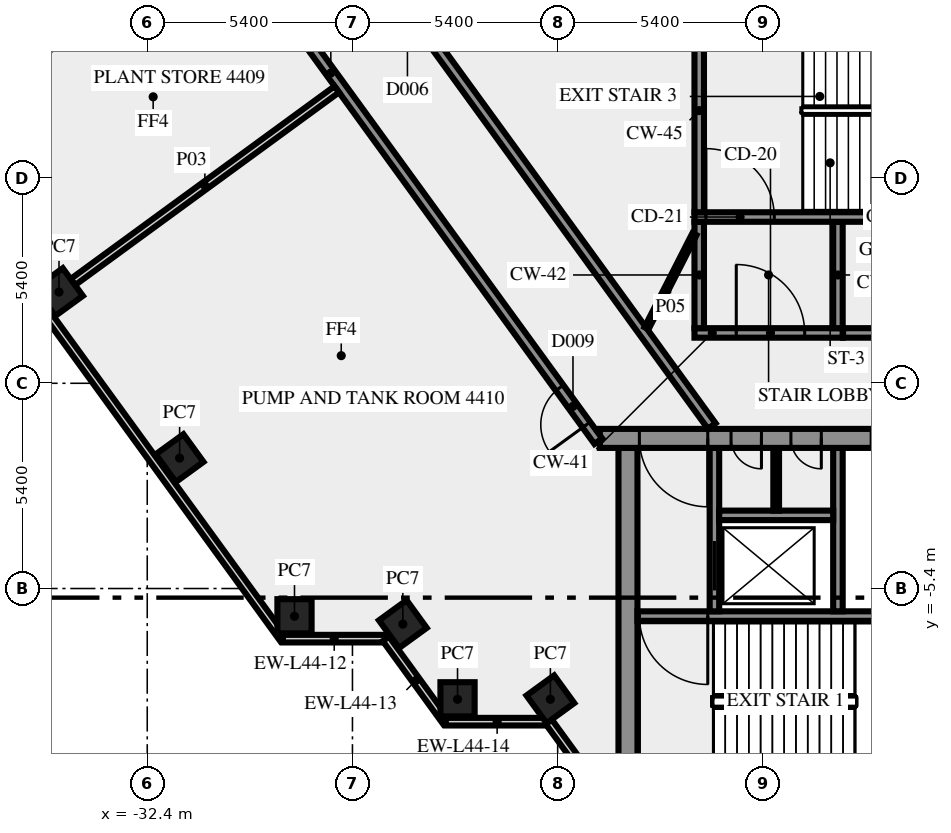
"""IFC4 building model, lengths in metres.
Left out: names, types, materials, properties, quantities, classifications, styles, units other than length and angle.
Written with IfcOpenShell. Run it as: python <this file> out.ifc"""

import sys

from ifc_helpers import new_model, si_unit, direction, frame, frame_2d, origin, origin_2d, place, context, subcontext, project, spatial, rectangle, extrude, element, fill, save


model = new_model("IFC4")
c1 = context("Model", 3, precision=1e-05, world=origin(), true_north=direction((0.0, 1.0)))
c2 = subcontext(c1, "Body", "Model", "MODEL_VIEW")
j1 = project(units=[si_unit("LENGTHUNIT", "METRE"), si_unit("PLANEANGLEUNIT", "RADIAN")], contexts=[c1])
p1 = place(None, origin())
s1 = spatial("IfcSite", under=j1, at=p1, CompositionType="ELEMENT")
p2 = place(p1, origin())
s2 = spatial("IfcBuilding", under=s1, at=p2, CompositionType="ELEMENT")
p3 = place(p2, frame((0.0, 0.0, 188.0)))
s3 = spatial("IfcBuildingStorey", under=s2, at=p3, CompositionType="ELEMENT", Elevation=188.0)
for number, where, z_axis, x_axis in (
    (1, (-34.722, 2.4, 0.0), (0.0, 0.0, 1.0), (0.588, -0.809, 0.0)),
    (2, (-31.548, -1.969, 0.0), (0.0, 0.0, 1.0), (0.588, -0.809, 0.0)),
    (3, (-28.525, -6.13, 0.0), (0.0, 0.0, 1.0), (1.0, 0.0, 0.0)),
    (4, (-25.674, -6.337, 0.0), (0.0, 0.0, 1.0), (0.588, -0.809, 0.0)),
    (5, (-24.235, -8.315, 0.0), (0.0, 0.0, 1.0), (1.0, 0.0, 0.0)),
    (6, (-21.792, -8.315, 0.0), (0.0, 0.0, 1.0), (0.588, -0.809, 0.0)),
):
    element("IfcColumn", number, at=place(p3, frame(where, z_axis=z_axis, x_axis=x_axis)), inside=s3, PredefinedType="COLUMN", context=c2, shape_type="SweptSolid", body=[
        extrude(rectangle(XDim=0.9, YDim=0.9, at=origin_2d()), origin(), (0.0, 0.0, 1.0), 5.65),
    ])
p4 = place(p3, frame((-45.84, 16.701, 0.0), z_axis=(0.0, 0.0, 1.0), x_axis=(0.587788110303, -0.809014917901, 0.0)))
e7 = element("IfcWall", 7, at=p4, inside=s3, PredefinedType="SOLIDWALL", context=c2, shape_type="SweptSolid", body=[
    extrude(rectangle(XDim=28.956, YDim=0.2, at=frame_2d((14.478, 0.0))), origin(), (0.0, 0.0, 1.0), 5.65),
])
p5 = place(p3, frame((-28.83, -6.719, 0.0), z_axis=(0.0, 0.0, 1.0), x_axis=(1.0, 0.0, 0.0)))
e8 = element("IfcWall", 8, at=p5, inside=s3, PredefinedType="SOLIDWALL", context=c2, shape_type="SweptSolid", body=[
    extrude(rectangle(XDim=2.7, YDim=0.2, at=frame_2d((1.35, 0.0))), origin(), (0.0, 0.0, 1.0), 5.65),
])
p6 = place(p3, frame((-26.12, -6.724, 0.0), z_axis=(0.0, 0.0, 1.0), x_axis=(0.587720002413, -0.809064397168, 0.0)))
e9 = element("IfcWall", 9, at=p6, inside=s3, PredefinedType="SOLIDWALL", context=c2, shape_type="SweptSolid", body=[
    extrude(rectangle(XDim=2.7, YDim=0.2, at=frame_2d((1.35, 0.0))), origin(), (0.0, 0.0, 1.0), 5.65),
])
p7 = place(p3, frame((-24.543, -8.904, 0.0), z_axis=(0.0, 0.0, 1.0), x_axis=(1.0, 0.0, 0.0)))
e10 = element("IfcWall", 10, at=p7, inside=s3, PredefinedType="SOLIDWALL", context=c2, shape_type="SweptSolid", body=[
    extrude(rectangle(XDim=2.7, YDim=0.2, at=frame_2d((1.35, 0.0))), origin(), (0.0, 0.0, 1.0), 5.65),
])
p8 = place(p3, frame((-21.833, -8.909, 0.0), z_axis=(0.0, 0.0, 1.0), x_axis=(0.587766567315, -0.809030569476, 0.0)))
e11 = element("IfcWall", 11, at=p8, inside=s3, PredefinedType="SOLIDWALL", context=c2, shape_type="SweptSolid", body=[
    extrude(rectangle(XDim=2.688, YDim=0.2, at=frame_2d((1.344, 0.0))), origin(), (0.0, 0.0, 1.0), 5.65),
])
p9 = place(p3, frame((-19.75, -10.5, 0.0), z_axis=(0.0, 0.0, 1.0), x_axis=(0.0, 1.0, 0.0)))
e12 = element("IfcWall", 12, at=p9, inside=s3, PredefinedType="SHEAR", context=c2, shape_type="SweptSolid", body=[
    extrude(rectangle(XDim=8.8, YDim=0.5, at=frame_2d((4.4, 0.0))), origin(), (0.0, 0.0, 1.0), 5.65),
])
p10 = place(p3, frame((-11.45, -6.125, 0.0), z_axis=(0.0, 0.0, 1.0), x_axis=(-1.0, 0.0, 0.0)))
e13 = element("IfcWall", 13, at=p10, inside=s3, PredefinedType="SHEAR", context=c2, shape_type="SweptSolid", body=[
    extrude(rectangle(XDim=8.05, YDim=0.25, at=frame_2d((4.025, 0.0))), origin(), (0.0, 0.0, 1.0), 5.65),
])
p11 = place(p10, frame((6.2, 0.0, 0.0)))
e14 = element("IfcOpeningElement", 14, at=p11, cuts=e13, PredefinedType="OPENING", context=c2, shape_type="SweptSolid", body=[
    extrude(rectangle(XDim=1.8, YDim=2.1, at=frame_2d((0.9, 1.05))), frame((0.0, 0.135, 0.0), z_axis=(0.0, -1.0, 0.0), x_axis=(1.0, 0.0, 0.0)), (0.0, 0.0, 1.0), 0.27),
])
p12 = place(p3, frame((-17.475, -6.0, 0.0), z_axis=(0.0, 0.0, 1.0), x_axis=(0.0, 1.0, 0.0)))
e15 = element("IfcWall", 15, at=p12, inside=s3, PredefinedType="SHEAR", context=c2, shape_type="SweptSolid", body=[
    extrude(rectangle(XDim=4.3, YDim=0.25, at=frame_2d((2.15, 0.0))), origin(), (0.0, 0.0, 1.0), 5.65),
])
p13 = place(p12, frame((0.55, 0.0, 0.0)))
e16 = element("IfcOpeningElement", 16, at=p13, cuts=e15, PredefinedType="OPENING", context=c2, shape_type="SweptSolid", body=[
    extrude(rectangle(XDim=1.3, YDim=2.1, at=frame_2d((0.65, 1.05))), frame((0.0, 0.135, 0.0), z_axis=(0.0, -1.0, 0.0), x_axis=(1.0, 0.0, 0.0)), (0.0, 0.0, 1.0), 0.27),
])
p14 = place(p3, frame((-14.225, -6.0, 0.0), z_axis=(0.0, 0.0, 1.0), x_axis=(0.0, 1.0, 0.0)))
e17 = element("IfcWall", 17, at=p14, inside=s3, PredefinedType="SHEAR", context=c2, shape_type="SweptSolid", body=[
    extrude(rectangle(XDim=4.3, YDim=0.25, at=frame_2d((2.15, 0.0))), origin(), (0.0, 0.0, 1.0), 5.65),
])
p15 = place(p3, frame((-17.35, -3.475, 0.0), z_axis=(0.0, 0.0, 1.0), x_axis=(1.0, 0.0, 0.0)))
e18 = element("IfcWall", 18, at=p15, inside=s3, PredefinedType="SHEAR", context=c2, shape_type="SweptSolid", body=[
    extrude(rectangle(XDim=3.0, YDim=0.25, at=frame_2d((1.5, 0.0))), origin(), (0.0, 0.0, 1.0), 5.65),
])
p16 = place(p3, frame((-15.85, -3.35, 0.0), z_axis=(0.0, 0.0, 1.0), x_axis=(0.0, 1.0, 0.0)))
e19 = element("IfcWall", 19, at=p16, inside=s3, PredefinedType="PARTITIONING", context=c2, shape_type="SweptSolid", body=[
    extrude(rectangle(XDim=1.65, YDim=0.15, at=frame_2d((0.825, 0.0))), origin(), (0.0, 0.0, 1.0), 5.65),
])
p17 = place(p3, frame((20.49, -1.45, 0.0), z_axis=(0.0, 0.0, 1.0), x_axis=(-1.0, 0.0, 0.0)))
e20 = element("IfcWall", 20, at=p17, inside=s3, PredefinedType="SHEAR", context=c2, shape_type="SweptSolid", body=[
    extrude(rectangle(XDim=40.98, YDim=0.5, at=frame_2d((20.49, 0.0))), origin(), (0.0, 0.0, 1.0), 5.65),
])
p18 = place(p17, frame((38.14, 0.0, 0.0)))
e21 = element("IfcOpeningElement", 21, at=p18, cuts=e20, PredefinedType="OPENING", context=c2, shape_type="SweptSolid", body=[
    extrude(rectangle(XDim=1.8, YDim=2.1, at=frame_2d((0.9, 1.05))), frame((0.0, 0.26, 0.0), z_axis=(0.0, -1.0, 0.0), x_axis=(1.0, 0.0, 0.0)), (0.0, 0.0, 1.0), 0.52),
])
p19 = place(p17, frame((36.728, 0.0, 0.0)))
e22 = element("IfcOpeningElement", 22, at=p19, cuts=e20, PredefinedType="OPENING", context=c2, shape_type="SweptSolid", body=[
    extrude(rectangle(XDim=0.8, YDim=2.1, at=frame_2d((0.4, 1.05))), frame((0.0, 0.26, 0.0), z_axis=(0.0, -1.0, 0.0), x_axis=(1.0, 0.0, 0.0)), (0.0, 0.0, 1.0), 0.52),
])
p20 = place(p17, frame((35.153, 0.0, 0.0)))
e23 = element("IfcOpeningElement", 23, at=p20, cuts=e20, PredefinedType="OPENING", context=c2, shape_type="SweptSolid", body=[
    extrude(rectangle(XDim=0.8, YDim=2.1, at=frame_2d((0.4, 1.05))), frame((0.0, 0.26, 0.0), z_axis=(0.0, -1.0, 0.0), x_axis=(1.0, 0.0, 0.0)), (0.0, 0.0, 1.0), 0.52),
])
p21 = place(p17, frame((32.94, 0.0, 0.0)))
e24 = element("IfcOpeningElement", 24, at=p21, cuts=e20, PredefinedType="OPENING", context=c2, shape_type="SweptSolid", body=[
    extrude(rectangle(XDim=0.9, YDim=2.1, at=frame_2d((0.45, 1.05))), frame((0.0, 0.26, 0.0), z_axis=(0.0, -1.0, 0.0), x_axis=(1.0, 0.0, 0.0)), (0.0, 0.0, 1.0), 0.52),
])
p22 = place(p17, frame((30.502, 0.0, 0.0)))
e25 = element("IfcOpeningElement", 25, at=p22, cuts=e20, PredefinedType="OPENING", context=c2, shape_type="SweptSolid", body=[
    extrude(rectangle(XDim=0.9, YDim=2.1, at=frame_2d((0.45, 1.05))), frame((0.0, 0.26, 0.0), z_axis=(0.0, -1.0, 0.0), x_axis=(1.0, 0.0, 0.0)), (0.0, 0.0, 1.0), 0.52),
])
p23 = place(p17, frame((28.14, 0.0, 0.0)))
e26 = element("IfcOpeningElement", 26, at=p23, cuts=e20, PredefinedType="OPENING", context=c2, shape_type="SweptSolid", body=[
    extrude(rectangle(XDim=0.9, YDim=2.1, at=frame_2d((0.45, 1.05))), frame((0.0, 0.26, 0.0), z_axis=(0.0, -1.0, 0.0), x_axis=(1.0, 0.0, 0.0)), (0.0, 0.0, 1.0), 0.52),
])
p24 = place(p17, frame((25.478, 0.0, 0.0)))
e27 = element("IfcOpeningElement", 27, at=p24, cuts=e20, PredefinedType="OPENING", context=c2, shape_type="SweptSolid", body=[
    extrude(rectangle(XDim=0.9, YDim=2.1, at=frame_2d((0.45, 1.05))), frame((0.0, 0.26, 0.0), z_axis=(0.0, -1.0, 0.0), x_axis=(1.0, 0.0, 0.0)), (0.0, 0.0, 1.0), 0.52),
])
p25 = place(p17, frame((21.765, 0.0, 0.0)))
e28 = element("IfcOpeningElement", 28, at=p25, cuts=e20, PredefinedType="OPENING", context=c2, shape_type="SweptSolid", body=[
    extrude(rectangle(XDim=2.0, YDim=2.1, at=frame_2d((1.0, 1.05))), frame((0.0, 0.26, 0.0), z_axis=(0.0, -1.0, 0.0), x_axis=(1.0, 0.0, 0.0)), (0.0, 0.0, 1.0), 0.52),
])
p26 = place(p17, frame((7.14, 0.0, 0.0)))
e29 = element("IfcOpeningElement", 29, at=p26, cuts=e20, PredefinedType="OPENING", context=c2, shape_type="SweptSolid", body=[
    extrude(rectangle(XDim=0.9, YDim=2.1, at=frame_2d((0.45, 1.05))), frame((0.0, 0.26, 0.0), z_axis=(0.0, -1.0, 0.0), x_axis=(1.0, 0.0, 0.0)), (0.0, 0.0, 1.0), 0.52),
])
p27 = place(p17, frame((4.19, 0.0, 0.0)))
e30 = element("IfcOpeningElement", 30, at=p27, cuts=e20, PredefinedType="OPENING", context=c2, shape_type="SweptSolid", body=[
    extrude(rectangle(XDim=0.9, YDim=2.1, at=frame_2d((0.45, 1.05))), frame((0.0, 0.26, 0.0), z_axis=(0.0, -1.0, 0.0), x_axis=(1.0, 0.0, 0.0)), (0.0, 0.0, 1.0), 0.52),
])
p28 = place(p17, frame((1.04, 0.0, 0.0)))
e31 = element("IfcOpeningElement", 31, at=p28, cuts=e20, PredefinedType="OPENING", context=c2, shape_type="SweptSolid", body=[
    extrude(rectangle(XDim=1.8, YDim=2.1, at=frame_2d((0.9, 1.05))), frame((0.0, 0.26, 0.0), z_axis=(0.0, -1.0, 0.0), x_axis=(1.0, 0.0, 0.0)), (0.0, 0.0, 1.0), 0.52),
])
p29 = place(p3, frame((-18.0, 1.325, 0.0), z_axis=(0.0, 0.0, 1.0), x_axis=(1.0, 0.0, 0.0)))
e32 = element("IfcWall", 32, at=p29, inside=s3, PredefinedType="SHEAR", context=c2, shape_type="SweptSolid", body=[
    extrude(rectangle(XDim=3.9, YDim=0.25, at=frame_2d((1.95, 0.0))), origin(), (0.0, 0.0, 1.0), 5.65),
])
p30 = place(p29, frame((1.1, 0.0, 0.0)))
e33 = element("IfcOpeningElement", 33, at=p30, cuts=e32, PredefinedType="OPENING", context=c2, shape_type="SweptSolid", body=[
    extrude(rectangle(XDim=1.8, YDim=2.1, at=frame_2d((0.9, 1.05))), frame((0.0, 0.135, 0.0), z_axis=(0.0, -1.0, 0.0), x_axis=(1.0, 0.0, 0.0)), (0.0, 0.0, 1.0), 0.27),
])
for number, where, z_axis, x_axis in (
    (34, (-17.875, 1.45, 0.0), (0.0, 0.0, 1.0), (0.0, 1.0, 0.0)),
    (35, (-14.225, 1.45, 0.0), (0.0, 0.0, 1.0), (0.0, 1.0, 0.0)),
):
    element("IfcWall", number, at=place(p3, frame(where, z_axis=z_axis, x_axis=x_axis)), inside=s3, PredefinedType="SHEAR", context=c2, shape_type="SweptSolid", body=[
        extrude(rectangle(XDim=2.8, YDim=0.25, at=frame_2d((1.4, 0.0))), origin(), (0.0, 0.0, 1.0), 5.65),
    ])
p31 = place(p3, frame((-18.0, 4.375, 0.0), z_axis=(0.0, 0.0, 1.0), x_axis=(1.0, 0.0, 0.0)))
e36 = element("IfcWall", 36, at=p31, inside=s3, PredefinedType="SHEAR", context=c2, shape_type="SweptSolid", body=[
    extrude(rectangle(XDim=10.5, YDim=0.25, at=frame_2d((5.25, 0.0))), origin(), (0.0, 0.0, 1.0), 5.65),
])
p32 = place(p31, frame((0.3, 0.0, 0.0)))
e37 = element("IfcOpeningElement", 37, at=p32, cuts=e36, PredefinedType="OPENING", context=c2, shape_type="SweptSolid", body=[
    extrude(rectangle(XDim=1.8, YDim=2.1, at=frame_2d((0.9, 1.05))), frame((0.0, 0.135, 0.0), z_axis=(0.0, -1.0, 0.0), x_axis=(1.0, 0.0, 0.0)), (0.0, 0.0, 1.0), 0.27),
])
p33 = place(p3, frame((-17.875, 4.5, 0.0), z_axis=(0.0, 0.0, 1.0), x_axis=(0.0, 1.0, 0.0)))
e38 = element("IfcWall", 38, at=p33, inside=s3, PredefinedType="SHEAR", context=c2, shape_type="SweptSolid", body=[
    extrude(rectangle(XDim=5.35, YDim=0.25, at=frame_2d((2.675, 0.0))), origin(), (0.0, 0.0, 1.0), 5.65),
])
p34 = place(p3, frame((-20.531, -1.523, 0.0), z_axis=(0.0, 0.0, 1.0), x_axis=(-0.587786778139, 0.80901588578, 0.0)))
e39 = element("IfcWall", 39, at=p34, inside=s3, PredefinedType="SOLIDWALL", context=c2, shape_type="SweptSolid", body=[
    extrude(rectangle(XDim=34.212, YDim=0.25, at=frame_2d((17.106, 0.0))), origin(), (0.0, 0.0, 1.0), 5.65),
])
p35 = place(p34, frame((15.666, 0.0, 0.0)))
e40 = element("IfcOpeningElement", 40, at=p35, cuts=e39, PredefinedType="OPENING", context=c2, shape_type="SweptSolid", body=[
    extrude(rectangle(XDim=0.9, YDim=2.1, at=frame_2d((0.45, 1.05))), frame((0.0, 0.135, 0.0), z_axis=(0.0, -1.0, 0.0), x_axis=(1.0, 0.0, 0.0)), (0.0, 0.0, 1.0), 0.27),
])
p36 = place(p34, frame((0.533, 0.0, 0.0)))
e41 = element("IfcOpeningElement", 41, at=p36, cuts=e39, PredefinedType="OPENING", context=c2, shape_type="SweptSolid", body=[
    extrude(rectangle(XDim=1.2, YDim=2.1, at=frame_2d((0.6, 1.05))), frame((0.0, 0.135, 0.0), z_axis=(0.0, -1.0, 0.0), x_axis=(1.0, 0.0, 0.0)), (0.0, 0.0, 1.0), 0.27),
])
p37 = place(p34, frame((17.266, 0.0, 0.0)))
e42 = element("IfcOpeningElement", 42, at=p37, cuts=e39, PredefinedType="OPENING", context=c2, shape_type="SweptSolid", body=[
    extrude(rectangle(XDim=1.2, YDim=2.1, at=frame_2d((0.6, 1.05))), frame((0.0, 0.135, 0.0), z_axis=(0.0, -1.0, 0.0), x_axis=(1.0, 0.0, 0.0)), (0.0, 0.0, 1.0), 0.27),
])
p38 = place(p3, frame((-38.44, 27.635, 0.0), z_axis=(0.0, 0.0, 1.0), x_axis=(0.587787785895, -0.809015153599, 0.0)))
e43 = element("IfcWall", 43, at=p38, inside=s3, PredefinedType="SOLIDWALL", context=c2, shape_type="SweptSolid", body=[
    extrude(rectangle(XDim=35.549, YDim=0.25, at=frame_2d((17.775, 0.0))), origin(), (0.0, 0.0, 1.0), 5.65),
])
p39 = place(p38, frame((21.025, 0.0, 0.0)))
e44 = element("IfcOpeningElement", 44, at=p39, cuts=e43, PredefinedType="OPENING", context=c2, shape_type="SweptSolid", body=[
    extrude(rectangle(XDim=1.8, YDim=2.1, at=frame_2d((0.9, 1.05))), frame((0.0, 0.135, 0.0), z_axis=(0.0, -1.0, 0.0), x_axis=(1.0, 0.0, 0.0)), (0.0, 0.0, 1.0), 0.27),
])
p40 = place(p38, frame((1.046, 0.0, 0.0)))
e45 = element("IfcOpeningElement", 45, at=p40, cuts=e43, PredefinedType="OPENING", context=c2, shape_type="SweptSolid", body=[
    extrude(rectangle(XDim=0.9, YDim=2.1, at=frame_2d((0.45, 1.05))), frame((0.0, 0.135, 0.0), z_axis=(0.0, -1.0, 0.0), x_axis=(1.0, 0.0, 0.0)), (0.0, 0.0, 1.0), 0.27),
])
p41 = place(p3, frame((-14.09, 1.325, 0.0), z_axis=(0.0, 0.0, 1.0), x_axis=(1.0, 0.0, 0.0)))
e46 = element("IfcWall", 46, at=p41, inside=s3, PredefinedType="SOLIDWALL", context=c2, shape_type="SweptSolid", body=[
    extrude(rectangle(XDim=9.431, YDim=0.25, at=frame_2d((4.716, 0.0))), origin(), (0.0, 0.0, 1.0), 5.65),
])
p42 = place(p41, frame((3.765, 0.0, 0.0)))
e47 = element("IfcOpeningElement", 47, at=p42, cuts=e46, PredefinedType="OPENING", context=c2, shape_type="SweptSolid", body=[
    extrude(rectangle(XDim=1.8, YDim=2.1, at=frame_2d((0.9, 1.05))), frame((0.0, 0.135, 0.0), z_axis=(0.0, -1.0, 0.0), x_axis=(1.0, 0.0, 0.0)), (0.0, 0.0, 1.0), 0.27),
])
p43 = place(p3, frame((-34.354, 2.667, 0.0), z_axis=(0.0, 0.0, 1.0), x_axis=(0.807581053567, 0.589756595487, 0.0)))
e48 = element("IfcWall", 48, at=p43, inside=s3, PredefinedType="SOLIDWALL", context=c2, shape_type="SweptSolid", body=[
    extrude(rectangle(XDim=8.594, YDim=0.2, at=frame_2d((4.297, 0.0))), origin(), (0.0, 0.0, 1.0), 5.65),
])
p44 = place(p3, frame((-30.563, 12.072, 0.0), z_axis=(0.0, 0.0, 1.0), x_axis=(-0.808979233367, -0.58783722235, 0.0)))
e49 = element("IfcWall", 49, at=p44, inside=s3, PredefinedType="SOLIDWALL", context=c2, shape_type="SweptSolid", body=[
    extrude(rectangle(XDim=8.595, YDim=0.2, at=frame_2d((4.297, 0.0))), origin(), (0.0, 0.0, 1.0), 5.65),
])
p45 = place(p3, frame((-19.261, 1.45, 0.0), z_axis=(0.0, 0.0, 1.0), x_axis=(0.453950796792, 0.891026752736, 0.0)))
e50 = element("IfcWall", 50, at=p45, inside=s3, PredefinedType="PARTITIONING", context=c2, shape_type="SweptSolid", body=[
    extrude(rectangle(XDim=2.778, YDim=0.12, at=frame_2d((1.389, 0.0))), origin(), (0.0, 0.0, 1.0), 5.65),
])
p46 = place(p11, origin())
e51 = element("IfcDoor", 51, at=p46, inside=s3, OperationType="DOUBLE_DOOR_SINGLE_SWING", PredefinedType="DOOR", context=c2, shape_type="SweptSolid", body=[
    extrude(rectangle(XDim=1.8, YDim=2.1, at=frame_2d((0.9, 1.05))), frame((0.0, 0.025, 0.0), z_axis=(0.0, -1.0, 0.0), x_axis=(1.0, 0.0, 0.0)), (0.0, 0.0, 1.0), 0.05),
])
fill(e14, e51)
p47 = place(p13, origin())
e52 = element("IfcDoor", 52, at=p47, inside=s3, OperationType="DOUBLE_DOOR_SLIDING", PredefinedType="DOOR", context=c2, shape_type="SweptSolid", body=[
    extrude(rectangle(XDim=1.3, YDim=2.1, at=frame_2d((0.65, 1.05))), frame((0.0, 0.025, 0.0), z_axis=(0.0, -1.0, 0.0), x_axis=(1.0, 0.0, 0.0)), (0.0, 0.0, 1.0), 0.05),
])
fill(e16, e52)
p48 = place(p18, origin())
e53 = element("IfcDoor", 53, at=p48, inside=s3, OperationType="DOUBLE_DOOR_SINGLE_SWING", PredefinedType="DOOR", context=c2, shape_type="SweptSolid", body=[
    extrude(rectangle(XDim=1.8, YDim=2.1, at=frame_2d((0.9, 1.05))), frame((0.0, 0.025, 0.0), z_axis=(0.0, -1.0, 0.0), x_axis=(1.0, 0.0, 0.0)), (0.0, 0.0, 1.0), 0.05),
])
fill(e21, e53)
p49 = place(p19, origin())
e54 = element("IfcDoor", 54, at=p49, inside=s3, OperationType="SINGLE_SWING_RIGHT", PredefinedType="DOOR", context=c2, shape_type="SweptSolid", body=[
    extrude(rectangle(XDim=0.8, YDim=2.1, at=frame_2d((0.4, 1.05))), frame((0.0, 0.025, 0.0), z_axis=(0.0, -1.0, 0.0), x_axis=(1.0, 0.0, 0.0)), (0.0, 0.0, 1.0), 0.05),
])
fill(e22, e54)
p50 = place(p20, origin())
e55 = element("IfcDoor", 55, at=p50, inside=s3, OperationType="SINGLE_SWING_RIGHT", PredefinedType="DOOR", context=c2, shape_type="SweptSolid", body=[
    extrude(rectangle(XDim=0.8, YDim=2.1, at=frame_2d((0.4, 1.05))), frame((0.0, 0.025, 0.0), z_axis=(0.0, -1.0, 0.0), x_axis=(1.0, 0.0, 0.0)), (0.0, 0.0, 1.0), 0.05),
])
fill(e23, e55)
p51 = place(p30, origin())
e56 = element("IfcDoor", 56, at=p51, inside=s3, OperationType="DOUBLE_DOOR_SINGLE_SWING", PredefinedType="DOOR", context=c2, shape_type="SweptSolid", body=[
    extrude(rectangle(XDim=1.8, YDim=2.1, at=frame_2d((0.9, 1.05))), frame((0.0, 0.025, 0.0), z_axis=(0.0, -1.0, 0.0), x_axis=(1.0, 0.0, 0.0)), (0.0, 0.0, 1.0), 0.05),
])
fill(e33, e56)
p52 = place(p32, origin())
e57 = element("IfcDoor", 57, at=p52, inside=s3, OperationType="DOUBLE_DOOR_SINGLE_SWING", PredefinedType="DOOR", context=c2, shape_type="SweptSolid", body=[
    extrude(rectangle(XDim=1.8, YDim=2.1, at=frame_2d((0.9, 1.05))), frame((0.0, 0.025, 0.0), z_axis=(0.0, -1.0, 0.0), x_axis=(1.0, 0.0, 0.0)), (0.0, 0.0, 1.0), 0.05),
])
fill(e37, e57)
p53 = place(p36, origin())
e58 = element("IfcDoor", 58, at=p53, inside=s3, OperationType="SINGLE_SWING_LEFT", PredefinedType="DOOR", context=c2, shape_type="SweptSolid", body=[
    extrude(rectangle(XDim=1.2, YDim=2.1, at=frame_2d((0.6, 1.05))), frame((0.0, 0.025, 0.0), z_axis=(0.0, -1.0, 0.0), x_axis=(1.0, 0.0, 0.0)), (0.0, 0.0, 1.0), 0.05),
])
fill(e41, e58)
save(model, sys.argv[1])
